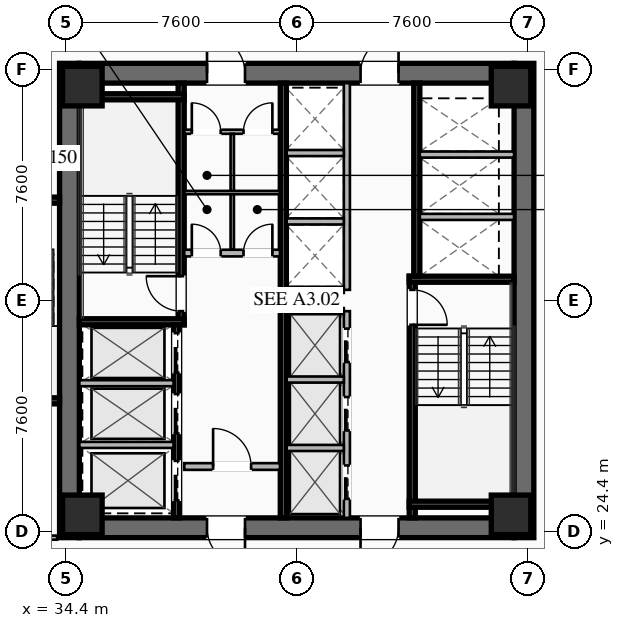
"""IFC4 building model, lengths in metres.
Left out: names, types, materials, properties, quantities, classifications, styles, units other than length and angle.
Written with IfcOpenShell. Run it as: python <this file> out.ifc"""

import sys

from ifc_helpers import new_model, si_unit, direction, frame, frame_2d, origin, origin_2d, place, context, subcontext, project, spatial, rectangle, hollow_rectangle, extrude, element, fill, save


model = new_model("IFC4")
c1 = context("Model", 3, precision=1e-05, world=origin(), true_north=direction((0.0, 1.0)))
c2 = subcontext(c1, "Body", "Model", "MODEL_VIEW")
j1 = project(units=[si_unit("LENGTHUNIT", "METRE"), si_unit("PLANEANGLEUNIT", "RADIAN")], contexts=[c1])
p1 = place(None, origin())
s1 = spatial("IfcSite", under=j1, at=p1, CompositionType="ELEMENT")
p2 = place(p1, origin())
s2 = spatial("IfcBuilding", under=s1, at=p2, CompositionType="ELEMENT")
p3 = place(p2, frame((0.0, 0.0, 74.3)))
s3 = spatial("IfcBuildingStorey", under=s2, at=p3, CompositionType="ELEMENT", Elevation=74.3)
for number, where, z_axis, x_axis in (
    (1, (34.525, 24.2, 0.0), (0.0, 0.0, 1.0), (0.0, 1.0, 0.0)),
    (2, (49.475, 39.8, 0.0), (0.0, 0.0, 1.0), (0.0, -1.0, 0.0)),
):
    element("IfcWall", number, at=place(p3, frame(where, z_axis=z_axis, x_axis=x_axis)), inside=s3, PredefinedType="SHEAR", context=c2, shape_type="SweptSolid", body=[
        extrude(rectangle(XDim=15.6, YDim=0.65, at=frame_2d((7.8, 0.0))), origin(), (0.0, 0.0, 1.0), 3.55),
    ])
p4 = place(p3, frame((49.15, 24.525, 0.0), z_axis=(0.0, 0.0, 1.0), x_axis=(-1.0, 0.0, 0.0)))
e3 = element("IfcWall", 3, at=p4, inside=s3, PredefinedType="SHEAR", context=c2, shape_type="SweptSolid", body=[
    extrude(rectangle(XDim=14.3, YDim=0.65, at=frame_2d((7.15, 0.0))), origin(), (0.0, 0.0, 1.0), 3.55),
])
p5 = place(p4, frame((8.85, 0.0, 0.0)))
e4 = element("IfcOpeningElement", 4, at=p5, cuts=e3, PredefinedType="OPENING", context=c2, shape_type="SweptSolid", body=[
    extrude(rectangle(XDim=1.25, YDim=2.25, at=frame_2d((0.625, 1.125))), frame((0.0, 0.335, 0.0), z_axis=(0.0, -1.0, 0.0), x_axis=(1.0, 0.0, 0.0)), (0.0, 0.0, 1.0), 0.67),
])
p6 = place(p4, frame((3.8, 0.0, 0.0)))
e5 = element("IfcOpeningElement", 5, at=p6, cuts=e3, PredefinedType="OPENING", context=c2, shape_type="SweptSolid", body=[
    extrude(rectangle(XDim=1.25, YDim=2.25, at=frame_2d((0.625, 1.125))), frame((0.0, 0.335, 0.0), z_axis=(0.0, -1.0, 0.0), x_axis=(1.0, 0.0, 0.0)), (0.0, 0.0, 1.0), 0.67),
])
p7 = place(p3, frame((34.85, 39.475, 0.0), z_axis=(0.0, 0.0, 1.0), x_axis=(1.0, 0.0, 0.0)))
e6 = element("IfcWall", 6, at=p7, inside=s3, PredefinedType="SHEAR", context=c2, shape_type="SweptSolid", body=[
    extrude(rectangle(XDim=14.3, YDim=0.65, at=frame_2d((7.15, 0.0))), origin(), (0.0, 0.0, 1.0), 3.55),
])
p8 = place(p7, frame((4.2, 0.0, 0.0)))
e7 = element("IfcOpeningElement", 7, at=p8, cuts=e6, PredefinedType="OPENING", context=c2, shape_type="SweptSolid", body=[
    extrude(rectangle(XDim=1.25, YDim=2.25, at=frame_2d((0.625, 1.125))), frame((0.0, 0.335, 0.0), z_axis=(0.0, -1.0, 0.0), x_axis=(1.0, 0.0, 0.0)), (0.0, 0.0, 1.0), 0.67),
])
p9 = place(p7, frame((9.25, 0.0, 0.0)))
e8 = element("IfcOpeningElement", 8, at=p9, cuts=e6, PredefinedType="OPENING", context=c2, shape_type="SweptSolid", body=[
    extrude(rectangle(XDim=1.25, YDim=2.25, at=frame_2d((0.625, 1.125))), frame((0.0, 0.335, 0.0), z_axis=(0.0, -1.0, 0.0), x_axis=(1.0, 0.0, 0.0)), (0.0, 0.0, 1.0), 0.67),
])
for number, where, z_axis, x_axis in (
    (9, (34.95, 24.95, 0.0), (0.0, 0.0, 1.0), (1.0, 0.0, 0.0)),
    (10, (49.05, 24.95, 0.0), (0.0, 0.0, 1.0), (1.0, 0.0, 0.0)),
    (11, (49.05, 39.05, 0.0), (0.0, 0.0, 1.0), (1.0, 0.0, 0.0)),
    (12, (34.95, 39.05, 0.0), (0.0, 0.0, 1.0), (1.0, 0.0, 0.0)),
):
    element("IfcColumn", number, at=place(p3, frame(where, z_axis=z_axis, x_axis=x_axis)), inside=s3, PredefinedType="COLUMN", context=c2, shape_type="SweptSolid", body=[
        extrude(hollow_rectangle(XDim=1.3, YDim=1.3, WallThickness=0.05, at=origin_2d()), origin(), (0.0, 0.0, 1.0), 3.35),
    ])
p10 = place(p3, frame((38.2, 31.2, 0.0), z_axis=(0.0, 0.0, 1.0), x_axis=(0.0, 1.0, 0.0)))
e13 = element("IfcWall", 13, at=p10, inside=s3, PredefinedType="SHEAR", context=c2, shape_type="SweptSolid", body=[
    extrude(rectangle(XDim=7.95, YDim=0.2, at=frame_2d((3.975, 0.0))), origin(), (0.0, 0.0, 1.0), 3.35),
])
p11 = place(p10, frame((0.45, 0.0, 0.0)))
e14 = element("IfcOpeningElement", 14, at=p11, cuts=e13, PredefinedType="OPENING", context=c2, shape_type="SweptSolid", body=[
    extrude(rectangle(XDim=1.15, YDim=2.2, at=frame_2d((0.575, 1.1))), frame((0.0, 0.11, 0.0), z_axis=(0.0, -1.0, 0.0), x_axis=(1.0, 0.0, 0.0)), (0.0, 0.0, 1.0), 0.22),
])
for number, where, z_axis, x_axis in (
    (15, (34.85, 31.3, 0.0), (0.0, 0.0, 1.0), (1.0, 0.0, 0.0)),
    (16, (34.85, 38.7, 0.0), (0.0, 0.0, 1.0), (1.0, 0.0, 0.0)),
):
    element("IfcWall", number, at=place(p3, frame(where, z_axis=z_axis, x_axis=x_axis)), inside=s3, PredefinedType="SHEAR", context=c2, shape_type="SweptSolid", body=[
        extrude(rectangle(XDim=3.45, YDim=0.2, at=frame_2d((1.725, 0.0))), origin(), (0.0, 0.0, 1.0), 3.35),
    ])
p12 = place(p3, frame((45.8, 32.8, 0.0), z_axis=(0.0, 0.0, 1.0), x_axis=(0.0, -1.0, 0.0)))
e17 = element("IfcWall", 17, at=p12, inside=s3, PredefinedType="SHEAR", context=c2, shape_type="SweptSolid", body=[
    extrude(rectangle(XDim=7.95, YDim=0.2, at=frame_2d((3.975, 0.0))), origin(), (0.0, 0.0, 1.0), 3.35),
])
p13 = place(p12, frame((0.45, 0.0, 0.0)))
e18 = element("IfcOpeningElement", 18, at=p13, cuts=e17, PredefinedType="OPENING", context=c2, shape_type="SweptSolid", body=[
    extrude(rectangle(XDim=1.15, YDim=2.2, at=frame_2d((0.575, 1.1))), frame((0.0, 0.11, 0.0), z_axis=(0.0, -1.0, 0.0), x_axis=(1.0, 0.0, 0.0)), (0.0, 0.0, 1.0), 0.22),
])
for number, where, z_axis, x_axis in (
    (19, (45.7, 32.7, 0.0), (0.0, 0.0, 1.0), (1.0, 0.0, 0.0)),
    (20, (45.7, 25.3, 0.0), (0.0, 0.0, 1.0), (1.0, 0.0, 0.0)),
):
    element("IfcWall", number, at=place(p3, frame(where, z_axis=z_axis, x_axis=x_axis)), inside=s3, PredefinedType="SHEAR", context=c2, shape_type="SweptSolid", body=[
        extrude(rectangle(XDim=3.45, YDim=0.2, at=frame_2d((1.725, 0.0))), origin(), (0.0, 0.0, 1.0), 3.35),
    ])
p14 = place(p3, frame((41.56, 24.85, 0.0), z_axis=(0.0, 0.0, 1.0), x_axis=(0.0, 1.0, 0.0)))
e21 = element("IfcWall", 21, at=p14, inside=s3, PredefinedType="SHEAR", context=c2, shape_type="SweptSolid", body=[
    extrude(rectangle(XDim=14.3, YDim=0.2, at=frame_2d((7.15, 0.0))), origin(), (0.0, 0.0, 1.0), 3.35),
])
p15 = place(p3, frame((38.3, 33.56, 0.0), z_axis=(0.0, 0.0, 1.0), x_axis=(1.0, 0.0, 0.0)))
e22 = element("IfcWall", 22, at=p15, inside=s3, PredefinedType="SOLIDWALL", context=c2, shape_type="SweptSolid", body=[
    extrude(rectangle(XDim=3.15, YDim=0.22, at=frame_2d((1.575, 0.0))), origin(), (0.0, 0.0, 1.0), 2.703),
])
p16 = place(p15, frame((0.25, 0.0, 0.0)))
e23 = element("IfcOpeningElement", 23, at=p16, cuts=e22, PredefinedType="OPENING", context=c2, shape_type="SweptSolid", body=[
    extrude(rectangle(XDim=0.95, YDim=2.05, at=frame_2d((0.475, 1.025))), frame((0.0, 0.12, 0.0), z_axis=(0.0, -1.0, 0.0), x_axis=(1.0, 0.0, 0.0)), (0.0, 0.0, 1.0), 0.24),
])
p17 = place(p15, frame((1.95, 0.0, 0.0)))
e24 = element("IfcOpeningElement", 24, at=p17, cuts=e22, PredefinedType="OPENING", context=c2, shape_type="SweptSolid", body=[
    extrude(rectangle(XDim=0.95, YDim=2.05, at=frame_2d((0.475, 1.025))), frame((0.0, 0.12, 0.0), z_axis=(0.0, -1.0, 0.0), x_axis=(1.0, 0.0, 0.0)), (0.0, 0.0, 1.0), 0.24),
])
p18 = place(p3, frame((38.3, 26.54, 0.0), z_axis=(0.0, 0.0, 1.0), x_axis=(1.0, 0.0, 0.0)))
e25 = element("IfcWall", 25, at=p18, inside=s3, PredefinedType="SOLIDWALL", context=c2, shape_type="SweptSolid", body=[
    extrude(rectangle(XDim=3.15, YDim=0.22, at=frame_2d((1.575, 0.0))), origin(), (0.0, 0.0, 1.0), 2.703),
])
p19 = place(p18, frame((0.95, 0.0, 0.0)))
e26 = element("IfcOpeningElement", 26, at=p19, cuts=e25, PredefinedType="OPENING", context=c2, shape_type="SweptSolid", body=[
    extrude(rectangle(XDim=1.25, YDim=2.25, at=frame_2d((0.625, 1.125))), frame((0.0, 0.12, 0.0), z_axis=(0.0, -1.0, 0.0), x_axis=(1.0, 0.0, 0.0)), (0.0, 0.0, 1.0), 0.24),
])
p20 = place(p3, frame((38.05, 24.85, 0.0), z_axis=(0.0, 0.0, 1.0), x_axis=(0.0, 1.0, 0.0)))
e27 = element("IfcWall", 27, at=p20, inside=s3, PredefinedType="SHEAR", context=c2, shape_type="SweptSolid", body=[
    extrude(rectangle(XDim=6.35, YDim=0.2, at=frame_2d((3.175, 0.0))), origin(), (0.0, 0.0, 1.0), 3.35),
])
p21 = place(p20, frame((4.775, 0.0, 0.0)))
e28 = element("IfcOpeningElement", 28, at=p21, cuts=e27, PredefinedType="OPENING", context=c2, shape_type="SweptSolid", body=[
    extrude(rectangle(XDim=1.3, YDim=2.25, at=frame_2d((0.65, 1.125))), frame((0.0, 0.11, 0.0), z_axis=(0.0, -1.0, 0.0), x_axis=(1.0, 0.0, 0.0)), (0.0, 0.0, 1.0), 0.22),
])
p22 = place(p20, frame((2.775, 0.0, 0.0)))
e29 = element("IfcOpeningElement", 29, at=p22, cuts=e27, PredefinedType="OPENING", context=c2, shape_type="SweptSolid", body=[
    extrude(rectangle(XDim=1.3, YDim=2.25, at=frame_2d((0.65, 1.125))), frame((0.0, 0.11, 0.0), z_axis=(0.0, -1.0, 0.0), x_axis=(1.0, 0.0, 0.0)), (0.0, 0.0, 1.0), 0.22),
])
p23 = place(p20, frame((0.575, 0.0, 0.0)))
e30 = element("IfcOpeningElement", 30, at=p23, cuts=e27, PredefinedType="OPENING", context=c2, shape_type="SweptSolid", body=[
    extrude(rectangle(XDim=1.3, YDim=2.25, at=frame_2d((0.65, 1.125))), frame((0.0, 0.11, 0.0), z_axis=(0.0, -1.0, 0.0), x_axis=(1.0, 0.0, 0.0)), (0.0, 0.0, 1.0), 0.22),
])
for number, where, z_axis, x_axis in (
    (31, (34.85, 27.25, 0.0), (0.0, 0.0, 1.0), (1.0, 0.0, 0.0)),
    (32, (34.85, 29.28, 0.0), (0.0, 0.0, 1.0), (1.0, 0.0, 0.0)),
):
    element("IfcWall", number, at=place(p3, frame(where, z_axis=z_axis, x_axis=x_axis)), inside=s3, PredefinedType="SOLIDWALL", context=c2, shape_type="SweptSolid", body=[
        extrude(rectangle(XDim=3.1, YDim=0.2, at=frame_2d((1.55, 0.0))), origin(), (0.0, 0.0, 1.0), 3.35),
    ])
p24 = place(p3, frame((45.95, 39.15, 0.0), z_axis=(0.0, 0.0, 1.0), x_axis=(0.0, -1.0, 0.0)))
e33 = element("IfcWall", 33, at=p24, inside=s3, PredefinedType="SHEAR", context=c2, shape_type="SweptSolid", body=[
    extrude(rectangle(XDim=6.35, YDim=0.2, at=frame_2d((3.175, 0.0))), origin(), (0.0, 0.0, 1.0), 3.35),
])
for number, where, z_axis, x_axis in (
    (34, (46.05, 34.75, 0.0), (0.0, 0.0, 1.0), (1.0, 0.0, 0.0)),
    (35, (46.05, 36.8, 0.0), (0.0, 0.0, 1.0), (1.0, 0.0, 0.0)),
):
    element("IfcWall", number, at=place(p3, frame(where, z_axis=z_axis, x_axis=x_axis)), inside=s3, PredefinedType="SOLIDWALL", context=c2, shape_type="SweptSolid", body=[
        extrude(rectangle(XDim=3.1, YDim=0.2, at=frame_2d((1.55, 0.0))), origin(), (0.0, 0.0, 1.0), 3.35),
    ])
p25 = place(p3, frame((38.3, 37.55, 0.0), z_axis=(0.0, 0.0, 1.0), x_axis=(1.0, 0.0, 0.0)))
e36 = element("IfcWall", 36, at=p25, inside=s3, PredefinedType="PARTITIONING", context=c2, shape_type="SweptSolid", body=[
    extrude(rectangle(XDim=3.15, YDim=0.135, at=frame_2d((1.575, 0.0))), origin(), (0.0, 0.0, 1.0), 2.703),
])
p26 = place(p25, frame((0.25, 0.0, 0.0)))
e37 = element("IfcOpeningElement", 37, at=p26, cuts=e36, PredefinedType="OPENING", context=c2, shape_type="SweptSolid", body=[
    extrude(rectangle(XDim=0.95, YDim=2.05, at=frame_2d((0.475, 1.025))), frame((0.0, 0.077, 0.0), z_axis=(0.0, -1.0, 0.0), x_axis=(1.0, 0.0, 0.0)), (0.0, 0.0, 1.0), 0.155),
])
p27 = place(p25, frame((1.95, 0.0, 0.0)))
e38 = element("IfcOpeningElement", 38, at=p27, cuts=e36, PredefinedType="OPENING", context=c2, shape_type="SweptSolid", body=[
    extrude(rectangle(XDim=0.95, YDim=2.05, at=frame_2d((0.475, 1.025))), frame((0.0, 0.077, 0.0), z_axis=(0.0, -1.0, 0.0), x_axis=(1.0, 0.0, 0.0)), (0.0, 0.0, 1.0), 0.155),
])
p28 = place(p3, frame((39.88, 33.68, 0.0), z_axis=(0.0, 0.0, 1.0), x_axis=(0.0, 1.0, 0.0)))
e39 = element("IfcWall", 39, at=p28, inside=s3, PredefinedType="PARTITIONING", context=c2, shape_type="SweptSolid", body=[
    extrude(rectangle(XDim=3.8, YDim=0.11, at=frame_2d((1.9, 0.0))), origin(), (0.0, 0.0, 1.0), 2.703),
])
p29 = place(p3, frame((38.3, 35.55, 0.0), z_axis=(0.0, 0.0, 1.0), x_axis=(1.0, 0.0, 0.0)))
e40 = element("IfcWall", 40, at=p29, inside=s3, PredefinedType="PARTITIONING", context=c2, shape_type="SweptSolid", body=[
    extrude(rectangle(XDim=3.15, YDim=0.11, at=frame_2d((1.575, 0.0))), origin(), (0.0, 0.0, 1.0), 2.703),
])
p30 = place(p3, frame((43.65, 24.85, 0.0), z_axis=(0.0, 0.0, 1.0), x_axis=(0.0, 1.0, 0.0)))
e41 = element("IfcWall", 41, at=p30, inside=s3, PredefinedType="SOLIDWALL", context=c2, shape_type="SweptSolid", body=[
    extrude(rectangle(XDim=6.8, YDim=0.2, at=frame_2d((3.4, 0.0))), origin(), (0.0, 0.0, 1.0), 3.35),
])
p31 = place(p30, frame((0.625, 0.0, 0.0)))
e42 = element("IfcOpeningElement", 42, at=p31, cuts=e41, PredefinedType="OPENING", context=c2, shape_type="SweptSolid", body=[
    extrude(rectangle(XDim=1.1, YDim=2.2, at=frame_2d((0.55, 1.1))), frame((0.0, 0.11, 0.0), z_axis=(0.0, -1.0, 0.0), x_axis=(1.0, 0.0, 0.0)), (0.0, 0.0, 1.0), 0.22),
])
p32 = place(p30, frame((2.875, 0.0, 0.0)))
e43 = element("IfcOpeningElement", 43, at=p32, cuts=e41, PredefinedType="OPENING", context=c2, shape_type="SweptSolid", body=[
    extrude(rectangle(XDim=1.1, YDim=2.2, at=frame_2d((0.55, 1.1))), frame((0.0, 0.11, 0.0), z_axis=(0.0, -1.0, 0.0), x_axis=(1.0, 0.0, 0.0)), (0.0, 0.0, 1.0), 0.22),
])
p33 = place(p30, frame((5.125, 0.0, 0.0)))
e44 = element("IfcOpeningElement", 44, at=p33, cuts=e41, PredefinedType="OPENING", context=c2, shape_type="SweptSolid", body=[
    extrude(rectangle(XDim=1.1, YDim=2.2, at=frame_2d((0.55, 1.1))), frame((0.0, 0.11, 0.0), z_axis=(0.0, -1.0, 0.0), x_axis=(1.0, 0.0, 0.0)), (0.0, 0.0, 1.0), 0.22),
])
for number, where, z_axis, x_axis in (
    (45, (41.67, 27.15, 0.0), (0.0, 0.0, 1.0), (1.0, 0.0, 0.0)),
    (46, (41.67, 29.4, 0.0), (0.0, 0.0, 1.0), (1.0, 0.0, 0.0)),
    (47, (41.67, 31.65, 0.0), (0.0, 0.0, 1.0), (1.0, 0.0, 0.0)),
):
    element("IfcWall", number, at=place(p3, frame(where, z_axis=z_axis, x_axis=x_axis)), inside=s3, PredefinedType="SOLIDWALL", context=c2, shape_type="SweptSolid", body=[
        extrude(rectangle(XDim=1.88, YDim=0.2, at=frame_2d((0.94, 0.0))), origin(), (0.0, 0.0, 1.0), 3.35),
    ])
p34 = place(p3, frame((43.65, 32.35, 0.0), z_axis=(0.0, 0.0, 1.0), x_axis=(0.0, 1.0, 0.0)))
e48 = element("IfcWall", 48, at=p34, inside=s3, PredefinedType="SOLIDWALL", context=c2, shape_type="SweptSolid", body=[
    extrude(rectangle(XDim=6.8, YDim=0.2, at=frame_2d((3.4, 0.0))), origin(), (0.0, 0.0, 1.0), 3.35),
])
for number, where, z_axis, x_axis in (
    (49, (41.67, 32.35, 0.0), (0.0, 0.0, 1.0), (1.0, 0.0, 0.0)),
    (50, (41.67, 34.6, 0.0), (0.0, 0.0, 1.0), (1.0, 0.0, 0.0)),
    (51, (41.67, 36.85, 0.0), (0.0, 0.0, 1.0), (1.0, 0.0, 0.0)),
):
    element("IfcWall", number, at=place(p3, frame(where, z_axis=z_axis, x_axis=x_axis)), inside=s3, PredefinedType="SOLIDWALL", context=c2, shape_type="SweptSolid", body=[
        extrude(rectangle(XDim=1.88, YDim=0.2, at=frame_2d((0.94, 0.0))), origin(), (0.0, 0.0, 1.0), 3.35),
    ])
p35 = place(p3, frame((34.2, 35.3, 0.0), z_axis=(0.0, 0.0, 1.0), x_axis=(-1.0, 0.0, 0.0)))
e52 = element("IfcWall", 52, at=p35, inside=s3, PredefinedType="SHEAR", context=c2, shape_type="SweptSolid", body=[
    extrude(rectangle(XDim=3.4, YDim=0.2, at=frame_2d((1.7, 0.0))), origin(), (0.0, 0.0, 1.0), 3.35),
])
p36 = place(p35, frame((0.275, 0.0, 0.0)))
e53 = element("IfcOpeningElement", 53, at=p36, cuts=e52, PredefinedType="OPENING", context=c2, shape_type="SweptSolid", body=[
    extrude(rectangle(XDim=1.15, YDim=2.2, at=frame_2d((0.575, 1.1))), frame((0.0, 0.11, 0.0), z_axis=(0.0, -1.0, 0.0), x_axis=(1.0, 0.0, 0.0)), (0.0, 0.0, 1.0), 0.22),
])
p37 = place(p3, frame((30.8, 28.7, 0.0), z_axis=(0.0, 0.0, 1.0), x_axis=(1.0, 0.0, 0.0)))
e54 = element("IfcWall", 54, at=p37, inside=s3, PredefinedType="SHEAR", context=c2, shape_type="SweptSolid", body=[
    extrude(rectangle(XDim=3.4, YDim=0.2, at=frame_2d((1.7, 0.0))), origin(), (0.0, 0.0, 1.0), 3.35),
])
p38 = place(p3, frame((21.02, 24.2, 0.0), z_axis=(0.0, 0.0, 1.0), x_axis=(1.0, 0.0, 0.0)))
e55 = element("IfcWall", 55, at=p38, inside=s3, PredefinedType="PARTITIONING", context=c2, shape_type="SweptSolid", body=[
    extrude(rectangle(XDim=13.1, YDim=0.135, at=frame_2d((6.55, 0.0))), origin(), (0.0, 0.0, 1.0), 2.703),
])
p39 = place(p38, frame((10.105, 0.0, 0.0)))
e56 = element("IfcOpeningElement", 56, at=p39, cuts=e55, PredefinedType="OPENING", context=c2, shape_type="SweptSolid", body=[
    extrude(rectangle(XDim=0.95, YDim=2.05, at=frame_2d((0.475, 1.025))), frame((0.0, 0.077, 0.0), z_axis=(0.0, -1.0, 0.0), x_axis=(1.0, 0.0, 0.0)), (0.0, 0.0, 1.0), 0.155),
])
p40 = place(p8, origin())
e57 = element("IfcDoor", 57, at=p40, inside=s3, OperationType="SINGLE_SWING_LEFT", PredefinedType="DOOR", context=c2, shape_type="SweptSolid", body=[
    extrude(rectangle(XDim=1.25, YDim=2.25, at=frame_2d((0.625, 1.125))), frame((0.0, 0.025, 0.0), z_axis=(0.0, -1.0, 0.0), x_axis=(1.0, 0.0, 0.0)), (0.0, 0.0, 1.0), 0.05),
])
fill(e7, e57)
p41 = place(p9, origin())
e58 = element("IfcDoor", 58, at=p41, inside=s3, OperationType="SINGLE_SWING_RIGHT", PredefinedType="DOOR", context=c2, shape_type="SweptSolid", body=[
    extrude(rectangle(XDim=1.25, YDim=2.25, at=frame_2d((0.625, 1.125))), frame((0.0, 0.025, 0.0), z_axis=(0.0, -1.0, 0.0), x_axis=(1.0, 0.0, 0.0)), (0.0, 0.0, 1.0), 0.05),
])
fill(e8, e58)
p42 = place(p5, origin())
e59 = element("IfcDoor", 59, at=p42, inside=s3, OperationType="SINGLE_SWING_LEFT", PredefinedType="DOOR", context=c2, shape_type="SweptSolid", body=[
    extrude(rectangle(XDim=1.25, YDim=2.25, at=frame_2d((0.625, 1.125))), frame((0.0, 0.025, 0.0), z_axis=(0.0, -1.0, 0.0), x_axis=(1.0, 0.0, 0.0)), (0.0, 0.0, 1.0), 0.05),
])
fill(e4, e59)
p43 = place(p6, origin())
e60 = element("IfcDoor", 60, at=p43, inside=s3, OperationType="SINGLE_SWING_RIGHT", PredefinedType="DOOR", context=c2, shape_type="SweptSolid", body=[
    extrude(rectangle(XDim=1.25, YDim=2.25, at=frame_2d((0.625, 1.125))), frame((0.0, 0.025, 0.0), z_axis=(0.0, -1.0, 0.0), x_axis=(1.0, 0.0, 0.0)), (0.0, 0.0, 1.0), 0.05),
])
fill(e5, e60)
p44 = place(p11, origin())
e61 = element("IfcDoor", 61, at=p44, inside=s3, OperationType="SINGLE_SWING_RIGHT", PredefinedType="DOOR", context=c2, shape_type="SweptSolid", body=[
    extrude(rectangle(XDim=1.15, YDim=2.2, at=frame_2d((0.575, 1.1))), frame((0.0, 0.025, 0.0), z_axis=(0.0, -1.0, 0.0), x_axis=(1.0, 0.0, 0.0)), (0.0, 0.0, 1.0), 0.05),
])
fill(e14, e61)
p45 = place(p13, origin())
e62 = element("IfcDoor", 62, at=p45, inside=s3, OperationType="SINGLE_SWING_RIGHT", PredefinedType="DOOR", context=c2, shape_type="SweptSolid", body=[
    extrude(rectangle(XDim=1.15, YDim=2.2, at=frame_2d((0.575, 1.1))), frame((0.0, 0.025, 0.0), z_axis=(0.0, -1.0, 0.0), x_axis=(1.0, 0.0, 0.0)), (0.0, 0.0, 1.0), 0.05),
])
fill(e18, e62)
p46 = place(p19, origin())
e63 = element("IfcDoor", 63, at=p46, inside=s3, OperationType="SINGLE_SWING_LEFT", PredefinedType="DOOR", context=c2, shape_type="SweptSolid", body=[
    extrude(rectangle(XDim=1.25, YDim=2.25, at=frame_2d((0.625, 1.125))), frame((0.0, 0.025, 0.0), z_axis=(0.0, -1.0, 0.0), x_axis=(1.0, 0.0, 0.0)), (0.0, 0.0, 1.0), 0.05),
])
fill(e26, e63)
p47 = place(p26, origin())
e64 = element("IfcDoor", 64, at=p47, inside=s3, OperationType="SINGLE_SWING_LEFT", PredefinedType="DOOR", context=c2, shape_type="SweptSolid", body=[
    extrude(rectangle(XDim=0.95, YDim=2.05, at=frame_2d((0.475, 1.025))), frame((0.0, 0.025, 0.0), z_axis=(0.0, -1.0, 0.0), x_axis=(1.0, 0.0, 0.0)), (0.0, 0.0, 1.0), 0.05),
])
fill(e37, e64)
p48 = place(p27, origin())
e65 = element("IfcDoor", 65, at=p48, inside=s3, OperationType="SINGLE_SWING_RIGHT", PredefinedType="DOOR", context=c2, shape_type="SweptSolid", body=[
    extrude(rectangle(XDim=0.95, YDim=2.05, at=frame_2d((0.475, 1.025))), frame((0.0, 0.025, 0.0), z_axis=(0.0, -1.0, 0.0), x_axis=(1.0, 0.0, 0.0)), (0.0, 0.0, 1.0), 0.05),
])
fill(e38, e65)
p49 = place(p16, origin())
e66 = element("IfcDoor", 66, at=p49, inside=s3, OperationType="SINGLE_SWING_LEFT", PredefinedType="DOOR", context=c2, shape_type="SweptSolid", body=[
    extrude(rectangle(XDim=0.95, YDim=2.05, at=frame_2d((0.475, 1.025))), frame((0.0, 0.025, 0.0), z_axis=(0.0, -1.0, 0.0), x_axis=(1.0, 0.0, 0.0)), (0.0, 0.0, 1.0), 0.05),
])
fill(e23, e66)
p50 = place(p17, origin())
e67 = element("IfcDoor", 67, at=p50, inside=s3, OperationType="SINGLE_SWING_RIGHT", PredefinedType="DOOR", context=c2, shape_type="SweptSolid", body=[
    extrude(rectangle(XDim=0.95, YDim=2.05, at=frame_2d((0.475, 1.025))), frame((0.0, 0.025, 0.0), z_axis=(0.0, -1.0, 0.0), x_axis=(1.0, 0.0, 0.0)), (0.0, 0.0, 1.0), 0.05),
])
fill(e24, e67)
p51 = place(p21, origin())
e68 = element("IfcDoor", 68, at=p51, inside=s3, OperationType="SLIDING_TO_LEFT", PredefinedType="DOOR", context=c2, shape_type="SweptSolid", body=[
    extrude(rectangle(XDim=1.3, YDim=2.25, at=frame_2d((0.65, 1.125))), frame((0.0, 0.025, 0.0), z_axis=(0.0, -1.0, 0.0), x_axis=(1.0, 0.0, 0.0)), (0.0, 0.0, 1.0), 0.05),
])
fill(e28, e68)
p52 = place(p22, origin())
e69 = element("IfcDoor", 69, at=p52, inside=s3, OperationType="SLIDING_TO_LEFT", PredefinedType="DOOR", context=c2, shape_type="SweptSolid", body=[
    extrude(rectangle(XDim=1.3, YDim=2.25, at=frame_2d((0.65, 1.125))), frame((0.0, 0.025, 0.0), z_axis=(0.0, -1.0, 0.0), x_axis=(1.0, 0.0, 0.0)), (0.0, 0.0, 1.0), 0.05),
])
fill(e29, e69)
p53 = place(p23, origin())
e70 = element("IfcDoor", 70, at=p53, inside=s3, OperationType="SLIDING_TO_LEFT", PredefinedType="DOOR", context=c2, shape_type="SweptSolid", body=[
    extrude(rectangle(XDim=1.3, YDim=2.25, at=frame_2d((0.65, 1.125))), frame((0.0, 0.025, 0.0), z_axis=(0.0, -1.0, 0.0), x_axis=(1.0, 0.0, 0.0)), (0.0, 0.0, 1.0), 0.05),
])
fill(e30, e70)
p54 = place(p31, origin())
e71 = element("IfcDoor", 71, at=p54, inside=s3, OperationType="SLIDING_TO_LEFT", PredefinedType="DOOR", context=c2, shape_type="SweptSolid", body=[
    extrude(rectangle(XDim=1.1, YDim=2.2, at=frame_2d((0.55, 1.1))), frame((0.0, 0.025, 0.0), z_axis=(0.0, -1.0, 0.0), x_axis=(1.0, 0.0, 0.0)), (0.0, 0.0, 1.0), 0.05),
])
fill(e42, e71)
p55 = place(p32, origin())
e72 = element("IfcDoor", 72, at=p55, inside=s3, OperationType="SLIDING_TO_LEFT", PredefinedType="DOOR", context=c2, shape_type="SweptSolid", body=[
    extrude(rectangle(XDim=1.1, YDim=2.2, at=frame_2d((0.55, 1.1))), frame((0.0, 0.025, 0.0), z_axis=(0.0, -1.0, 0.0), x_axis=(1.0, 0.0, 0.0)), (0.0, 0.0, 1.0), 0.05),
])
fill(e43, e72)
p56 = place(p33, origin())
e73 = element("IfcDoor", 73, at=p56, inside=s3, OperationType="SLIDING_TO_LEFT", PredefinedType="DOOR", context=c2, shape_type="SweptSolid", body=[
    extrude(rectangle(XDim=1.1, YDim=2.2, at=frame_2d((0.55, 1.1))), frame((0.0, 0.025, 0.0), z_axis=(0.0, -1.0, 0.0), x_axis=(1.0, 0.0, 0.0)), (0.0, 0.0, 1.0), 0.05),
])
fill(e44, e73)
save(model, sys.argv[1])
